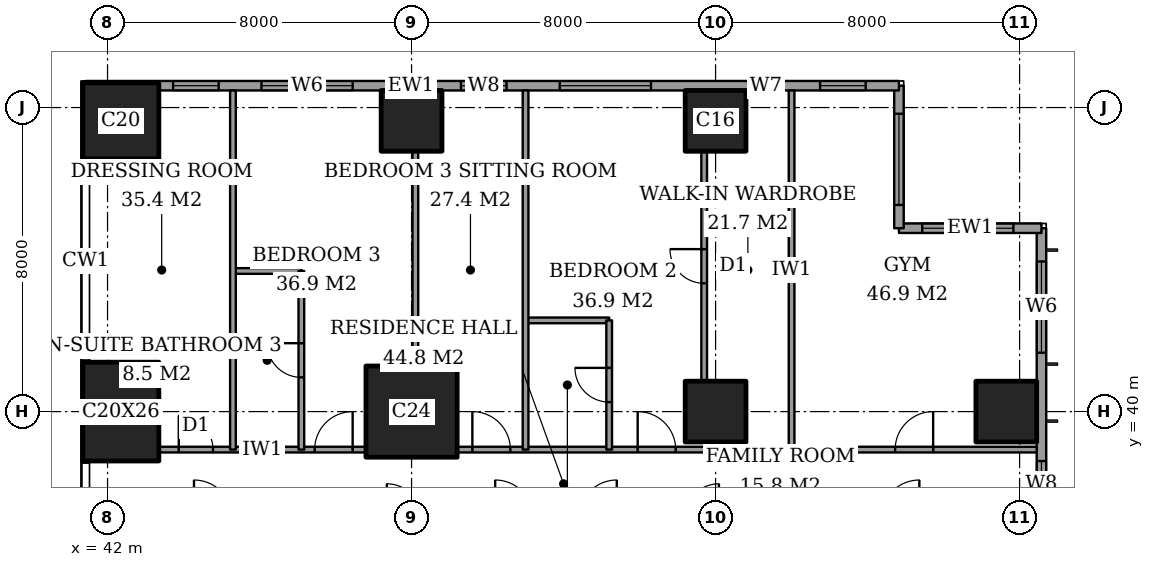
"""IFC4 building model, lengths in metres.
Left out: names, types, materials, properties, quantities, classifications, styles, units other than length and angle.
Written with IfcOpenShell. Run it as: python <this file> out.ifc"""

import sys

from ifc_helpers import new_model, si_unit, direction, frame, frame_2d, origin, origin_2d, place, context, subcontext, project, spatial, rectangle, extrude, element, fill, save


model = new_model("IFC4")
c1 = context("Model", 3, precision=1e-05, world=origin(), true_north=direction((0.0, 1.0)))
c2 = subcontext(c1, "Body", "Model", "MODEL_VIEW")
j1 = project(units=[si_unit("LENGTHUNIT", "METRE"), si_unit("PLANEANGLEUNIT", "RADIAN")], contexts=[c1])
p1 = place(None, origin())
s1 = spatial("IfcSite", under=j1, at=p1, CompositionType="ELEMENT")
p2 = place(p1, origin())
s2 = spatial("IfcBuilding", under=s1, at=p2, CompositionType="ELEMENT")
p3 = place(p2, frame((0.0, 0.0, 262.8)))
s3 = spatial("IfcBuildingStorey", under=s2, at=p3, CompositionType="ELEMENT", Elevation=262.8)
p4 = place(p3, frame((42.35, 40.0, 0.0), z_axis=(0.0, 0.0, 1.0), x_axis=(1.0, 0.0, 0.0)))
e1 = element("IfcColumn", 1, at=p4, inside=s3, PredefinedType="COLUMN", context=c2, shape_type="SweptSolid", body=[
    extrude(rectangle(XDim=2.0, YDim=2.6, at=origin_2d()), origin(), (0.0, 0.0, 1.0), 3.6),
])
p5 = place(p3, frame((42.35, 47.65, 0.0), z_axis=(0.0, 0.0, 1.0), x_axis=(1.0, 0.0, 0.0)))
e2 = element("IfcColumn", 2, at=p5, inside=s3, PredefinedType="COLUMN", context=c2, shape_type="SweptSolid", body=[
    extrude(rectangle(XDim=2.0, YDim=2.0, at=origin_2d()), origin(), (0.0, 0.0, 1.0), 3.6),
])
p6 = place(p3, frame((50.0, 40.0, 0.0), z_axis=(0.0, 0.0, 1.0), x_axis=(1.0, 0.0, 0.0)))
e3 = element("IfcColumn", 3, at=p6, inside=s3, PredefinedType="COLUMN", context=c2, shape_type="SweptSolid", body=[
    extrude(rectangle(XDim=2.4, YDim=2.4, at=origin_2d()), origin(), (0.0, 0.0, 1.0), 3.6),
])
for number, where, z_axis, x_axis in (
    (4, (50.0, 47.65, 0.0), (0.0, 0.0, 1.0), (1.0, 0.0, 0.0)),
    (5, (58.0, 40.0, 0.0), (0.0, 0.0, 1.0), (1.0, 0.0, 0.0)),
    (6, (58.0, 47.65, 0.0), (0.0, 0.0, 1.0), (1.0, 0.0, 0.0)),
    (7, (65.65, 40.0, 0.0), (0.0, 0.0, 1.0), (1.0, 0.0, 0.0)),
):
    element("IfcColumn", number, at=place(p3, frame(where, z_axis=z_axis, x_axis=x_axis)), inside=s3, PredefinedType="COLUMN", context=c2, shape_type="SweptSolid", body=[
        extrude(rectangle(XDim=1.6, YDim=1.6, at=origin_2d()), origin(), (0.0, 0.0, 1.0), 3.6),
    ])
p7 = place(p3, frame((66.575, 3.175, 0.0), z_axis=(0.0, 0.0, 1.0), x_axis=(0.0, 1.0, 0.0)))
e8 = element("IfcWall", 8, at=p7, inside=s3, PredefinedType="SOLIDWALL", context=c2, shape_type="SweptSolid", body=[
    extrude(rectangle(XDim=41.65, YDim=0.25, at=frame_2d((20.825, 0.0))), origin(), (0.0, 0.0, 1.0), 3.6),
])
p8 = place(p7, frame((0.875, 0.0, 0.6)))
e9 = element("IfcOpeningElement", 9, at=p8, cuts=e8, PredefinedType="OPENING", context=c2, shape_type="SweptSolid", body=[
    extrude(rectangle(XDim=2.4, YDim=2.0, at=frame_2d((1.2, 1.0))), frame((0.0, 0.135, 0.0), z_axis=(0.0, -1.0, 0.0), x_axis=(1.0, 0.0, 0.0)), (0.0, 0.0, 1.0), 0.27),
])
p9 = place(p7, frame((6.0, 0.0, 0.6)))
e10 = element("IfcOpeningElement", 10, at=p9, cuts=e8, PredefinedType="OPENING", context=c2, shape_type="SweptSolid", body=[
    extrude(rectangle(XDim=1.2, YDim=2.0, at=frame_2d((0.6, 1.0))), frame((0.0, 0.135, 0.0), z_axis=(0.0, -1.0, 0.0), x_axis=(1.0, 0.0, 0.0)), (0.0, 0.0, 1.0), 0.27),
])
p10 = place(p7, frame((8.525, 0.0, 0.6)))
e11 = element("IfcOpeningElement", 11, at=p10, cuts=e8, PredefinedType="OPENING", context=c2, shape_type="SweptSolid", body=[
    extrude(rectangle(XDim=2.4, YDim=2.0, at=frame_2d((1.2, 1.0))), frame((0.0, 0.135, 0.0), z_axis=(0.0, -1.0, 0.0), x_axis=(1.0, 0.0, 0.0)), (0.0, 0.0, 1.0), 0.27),
])
p11 = place(p7, frame((15.625, 0.0, 0.6)))
e12 = element("IfcOpeningElement", 12, at=p11, cuts=e8, PredefinedType="OPENING", context=c2, shape_type="SweptSolid", body=[
    extrude(rectangle(XDim=2.4, YDim=2.0, at=frame_2d((1.2, 1.0))), frame((0.0, 0.135, 0.0), z_axis=(0.0, -1.0, 0.0), x_axis=(1.0, 0.0, 0.0)), (0.0, 0.0, 1.0), 0.27),
])
p12 = place(p7, frame((23.525, 0.0, 0.6)))
e13 = element("IfcOpeningElement", 13, at=p12, cuts=e8, PredefinedType="OPENING", context=c2, shape_type="SweptSolid", body=[
    extrude(rectangle(XDim=2.4, YDim=2.0, at=frame_2d((1.2, 1.0))), frame((0.0, 0.135, 0.0), z_axis=(0.0, -1.0, 0.0), x_axis=(1.0, 0.0, 0.0)), (0.0, 0.0, 1.0), 0.27),
])
p13 = place(p7, frame((30.625, 0.0, 0.6)))
e14 = element("IfcOpeningElement", 14, at=p13, cuts=e8, PredefinedType="OPENING", context=c2, shape_type="SweptSolid", body=[
    extrude(rectangle(XDim=2.4, YDim=2.0, at=frame_2d((1.2, 1.0))), frame((0.0, 0.135, 0.0), z_axis=(0.0, -1.0, 0.0), x_axis=(1.0, 0.0, 0.0)), (0.0, 0.0, 1.0), 0.27),
])
p14 = place(p7, frame((34.325, 0.0, 0.6)))
e15 = element("IfcOpeningElement", 15, at=p14, cuts=e8, PredefinedType="OPENING", context=c2, shape_type="SweptSolid", body=[
    extrude(rectangle(XDim=1.2, YDim=2.0, at=frame_2d((0.6, 1.0))), frame((0.0, 0.135, 0.0), z_axis=(0.0, -1.0, 0.0), x_axis=(1.0, 0.0, 0.0)), (0.0, 0.0, 1.0), 0.27),
])
p15 = place(p7, frame((38.375, 0.0, 0.6)))
e16 = element("IfcOpeningElement", 16, at=p15, cuts=e8, PredefinedType="OPENING", context=c2, shape_type="SweptSolid", body=[
    extrude(rectangle(XDim=2.4, YDim=2.0, at=frame_2d((1.2, 1.0))), frame((0.0, 0.135, 0.0), z_axis=(0.0, -1.0, 0.0), x_axis=(1.0, 0.0, 0.0)), (0.0, 0.0, 1.0), 0.27),
])
p16 = place(p3, frame((66.575, 44.825, 0.0), z_axis=(0.0, 0.0, 1.0), x_axis=(-1.0, 0.0, 0.0)))
e17 = element("IfcWall", 17, at=p16, inside=s3, PredefinedType="SOLIDWALL", context=c2, shape_type="SweptSolid", body=[
    extrude(rectangle(XDim=3.75, YDim=0.25, at=frame_2d((1.875, 0.0))), origin(), (0.0, 0.0, 1.0), 3.6),
])
p17 = place(p16, frame((0.738, 0.0, 0.6)))
e18 = element("IfcOpeningElement", 18, at=p17, cuts=e17, PredefinedType="OPENING", context=c2, shape_type="SweptSolid", body=[
    extrude(rectangle(XDim=2.4, YDim=2.0, at=frame_2d((1.2, 1.0))), frame((0.0, 0.135, 0.0), z_axis=(0.0, -1.0, 0.0), x_axis=(1.0, 0.0, 0.0)), (0.0, 0.0, 1.0), 0.27),
])
p18 = place(p3, frame((62.825, 44.825, 0.0), z_axis=(0.0, 0.0, 1.0), x_axis=(0.0, 1.0, 0.0)))
e19 = element("IfcWall", 19, at=p18, inside=s3, PredefinedType="SOLIDWALL", context=c2, shape_type="SweptSolid", body=[
    extrude(rectangle(XDim=3.75, YDim=0.25, at=frame_2d((1.875, 0.0))), origin(), (0.0, 0.0, 1.0), 3.6),
])
p19 = place(p18, frame((0.613, 0.0, 0.6)))
e20 = element("IfcOpeningElement", 20, at=p19, cuts=e19, PredefinedType="OPENING", context=c2, shape_type="SweptSolid", body=[
    extrude(rectangle(XDim=2.4, YDim=2.0, at=frame_2d((1.2, 1.0))), frame((0.0, 0.135, 0.0), z_axis=(0.0, -1.0, 0.0), x_axis=(1.0, 0.0, 0.0)), (0.0, 0.0, 1.0), 0.27),
])
p20 = place(p3, frame((62.825, 48.575, 0.0), z_axis=(0.0, 0.0, 1.0), x_axis=(-1.0, 0.0, 0.0)))
e21 = element("IfcWall", 21, at=p20, inside=s3, PredefinedType="SOLIDWALL", context=c2, shape_type="SweptSolid", body=[
    extrude(rectangle(XDim=21.4, YDim=0.25, at=frame_2d((10.7, 0.0))), origin(), (0.0, 0.0, 1.0), 3.6),
])
p21 = place(p20, frame((0.875, 0.0, 0.6)))
e22 = element("IfcOpeningElement", 22, at=p21, cuts=e21, PredefinedType="OPENING", context=c2, shape_type="SweptSolid", body=[
    extrude(rectangle(XDim=1.2, YDim=2.0, at=frame_2d((0.6, 1.0))), frame((0.0, 0.135, 0.0), z_axis=(0.0, -1.0, 0.0), x_axis=(1.0, 0.0, 0.0)), (0.0, 0.0, 1.0), 0.27),
])
p22 = place(p20, frame((3.2, 0.0, 0.6)))
e23 = element("IfcOpeningElement", 23, at=p22, cuts=e21, PredefinedType="OPENING", context=c2, shape_type="SweptSolid", body=[
    extrude(rectangle(XDim=0.6, YDim=2.0, at=frame_2d((0.3, 1.0))), frame((0.0, 0.135, 0.0), z_axis=(0.0, -1.0, 0.0), x_axis=(1.0, 0.0, 0.0)), (0.0, 0.0, 1.0), 0.27),
])
p23 = place(p20, frame((6.525, 0.0, 0.6)))
e24 = element("IfcOpeningElement", 24, at=p23, cuts=e21, PredefinedType="OPENING", context=c2, shape_type="SweptSolid", body=[
    extrude(rectangle(XDim=2.4, YDim=2.0, at=frame_2d((1.2, 1.0))), frame((0.0, 0.135, 0.0), z_axis=(0.0, -1.0, 0.0), x_axis=(1.0, 0.0, 0.0)), (0.0, 0.0, 1.0), 0.27),
])
p24 = place(p20, frame((10.325, 0.0, 0.6)))
e25 = element("IfcOpeningElement", 25, at=p24, cuts=e21, PredefinedType="OPENING", context=c2, shape_type="SweptSolid", body=[
    extrude(rectangle(XDim=1.2, YDim=2.0, at=frame_2d((0.6, 1.0))), frame((0.0, 0.135, 0.0), z_axis=(0.0, -1.0, 0.0), x_axis=(1.0, 0.0, 0.0)), (0.0, 0.0, 1.0), 0.27),
])
p25 = place(p20, frame((14.375, 0.0, 0.6)))
e26 = element("IfcOpeningElement", 26, at=p25, cuts=e21, PredefinedType="OPENING", context=c2, shape_type="SweptSolid", body=[
    extrude(rectangle(XDim=2.4, YDim=2.0, at=frame_2d((1.2, 1.0))), frame((0.0, 0.135, 0.0), z_axis=(0.0, -1.0, 0.0), x_axis=(1.0, 0.0, 0.0)), (0.0, 0.0, 1.0), 0.27),
])
p26 = place(p20, frame((17.9, 0.0, 0.6)))
e27 = element("IfcOpeningElement", 27, at=p26, cuts=e21, PredefinedType="OPENING", context=c2, shape_type="SweptSolid", body=[
    extrude(rectangle(XDim=1.2, YDim=2.0, at=frame_2d((0.6, 1.0))), frame((0.0, 0.135, 0.0), z_axis=(0.0, -1.0, 0.0), x_axis=(1.0, 0.0, 0.0)), (0.0, 0.0, 1.0), 0.27),
])
p27 = place(p3, frame((43.35, 39.0, 0.0), z_axis=(0.0, 0.0, 1.0), x_axis=(1.0, 0.0, 0.0)))
e28 = element("IfcWall", 28, at=p27, inside=s3, PredefinedType="PARTITIONING", context=c2, shape_type="SweptSolid", body=[
    extrude(rectangle(XDim=5.45, YDim=0.15, at=frame_2d((2.725, 0.0))), origin(), (0.0, 0.0, 1.0), 3.35),
])
p28 = place(p27, frame((4.1, 0.0, 0.0)))
e29 = element("IfcOpeningElement", 29, at=p28, cuts=e28, PredefinedType="OPENING", context=c2, shape_type="SweptSolid", body=[
    extrude(rectangle(XDim=1.0, YDim=2.1, at=frame_2d((0.5, 1.05))), frame((0.0, 0.085, 0.0), z_axis=(0.0, -1.0, 0.0), x_axis=(1.0, 0.0, 0.0)), (0.0, 0.0, 1.0), 0.17),
])
p29 = place(p27, frame((0.525, 0.0, 0.0)))
e30 = element("IfcOpeningElement", 30, at=p29, cuts=e28, PredefinedType="OPENING", context=c2, shape_type="SweptSolid", body=[
    extrude(rectangle(XDim=0.9, YDim=2.1, at=frame_2d((0.45, 1.05))), frame((0.0, 0.085, 0.0), z_axis=(0.0, -1.0, 0.0), x_axis=(1.0, 0.0, 0.0)), (0.0, 0.0, 1.0), 0.17),
])
p30 = place(p3, frame((51.2, 39.0, 0.0), z_axis=(0.0, 0.0, 1.0), x_axis=(1.0, 0.0, 0.0)))
e31 = element("IfcWall", 31, at=p30, inside=s3, PredefinedType="PARTITIONING", context=c2, shape_type="SweptSolid", body=[
    extrude(rectangle(XDim=15.25, YDim=0.15, at=frame_2d((7.625, 0.0))), origin(), (0.0, 0.0, 1.0), 3.35),
])
p31 = place(p30, frame((11.525, 0.0, 0.0)))
e32 = element("IfcOpeningElement", 32, at=p31, cuts=e31, PredefinedType="OPENING", context=c2, shape_type="SweptSolid", body=[
    extrude(rectangle(XDim=1.0, YDim=2.1, at=frame_2d((0.5, 1.05))), frame((0.0, 0.085, 0.0), z_axis=(0.0, -1.0, 0.0), x_axis=(1.0, 0.0, 0.0)), (0.0, 0.0, 1.0), 0.17),
])
p32 = place(p30, frame((4.75, 0.0, 0.0)))
e33 = element("IfcOpeningElement", 33, at=p32, cuts=e31, PredefinedType="OPENING", context=c2, shape_type="SweptSolid", body=[
    extrude(rectangle(XDim=1.0, YDim=2.1, at=frame_2d((0.5, 1.05))), frame((0.0, 0.085, 0.0), z_axis=(0.0, -1.0, 0.0), x_axis=(1.0, 0.0, 0.0)), (0.0, 0.0, 1.0), 0.17),
])
p33 = place(p30, frame((0.4, 0.0, 0.0)))
e34 = element("IfcOpeningElement", 34, at=p33, cuts=e31, PredefinedType="OPENING", context=c2, shape_type="SweptSolid", body=[
    extrude(rectangle(XDim=1.0, YDim=2.1, at=frame_2d((0.5, 1.05))), frame((0.0, 0.085, 0.0), z_axis=(0.0, -1.0, 0.0), x_axis=(1.0, 0.0, 0.0)), (0.0, 0.0, 1.0), 0.17),
])
p34 = place(p3, frame((53.0, 42.4, 0.0), z_axis=(0.0, 0.0, 1.0), x_axis=(1.0, 0.0, 0.0)))
e35 = element("IfcWall", 35, at=p34, inside=s3, PredefinedType="PARTITIONING", context=c2, shape_type="SweptSolid", body=[
    extrude(rectangle(XDim=2.2, YDim=0.15, at=frame_2d((1.1, 0.0))), origin(), (0.0, 0.0, 1.0), 3.35),
])
p35 = place(p3, frame((45.3, 43.7, 0.0), z_axis=(0.0, 0.0, 1.0), x_axis=(1.0, 0.0, 0.0)))
e36 = element("IfcWall", 36, at=p35, inside=s3, PredefinedType="PARTITIONING", context=c2, shape_type="SweptSolid", body=[
    extrude(rectangle(XDim=1.8, YDim=0.15, at=frame_2d((0.9, 0.0))), origin(), (0.0, 0.0, 1.0), 3.35),
])
p36 = place(p3, frame((45.3, 39.0, 0.0), z_axis=(0.0, 0.0, 1.0), x_axis=(0.0, 1.0, 0.0)))
e37 = element("IfcWall", 37, at=p36, inside=s3, PredefinedType="PARTITIONING", context=c2, shape_type="SweptSolid", body=[
    extrude(rectangle(XDim=9.45, YDim=0.15, at=frame_2d((4.725, 0.0))), origin(), (0.0, 0.0, 1.0), 3.35),
])
p37 = place(p3, frame((47.1, 39.0, 0.0), z_axis=(0.0, 0.0, 1.0), x_axis=(0.0, 1.0, 0.0)))
e38 = element("IfcWall", 38, at=p37, inside=s3, PredefinedType="PARTITIONING", context=c2, shape_type="SweptSolid", body=[
    extrude(rectangle(XDim=4.7, YDim=0.15, at=frame_2d((2.35, 0.0))), origin(), (0.0, 0.0, 1.0), 3.35),
])
p38 = place(p37, frame((1.9, 0.0, 0.0)))
e39 = element("IfcOpeningElement", 39, at=p38, cuts=e38, PredefinedType="OPENING", context=c2, shape_type="SweptSolid", body=[
    extrude(rectangle(XDim=0.9, YDim=2.1, at=frame_2d((0.45, 1.05))), frame((0.0, 0.085, 0.0), z_axis=(0.0, -1.0, 0.0), x_axis=(1.0, 0.0, 0.0)), (0.0, 0.0, 1.0), 0.17),
])
p39 = place(p3, frame((50.1, 41.2, 0.0), z_axis=(0.0, 0.0, 1.0), x_axis=(0.0, 1.0, 0.0)))
e40 = element("IfcWall", 40, at=p39, inside=s3, PredefinedType="PARTITIONING", context=c2, shape_type="SweptSolid", body=[
    extrude(rectangle(XDim=5.65, YDim=0.15, at=frame_2d((2.825, 0.0))), origin(), (0.0, 0.0, 1.0), 3.35),
])
p40 = place(p3, frame((53.0, 39.0, 0.0), z_axis=(0.0, 0.0, 1.0), x_axis=(0.0, 1.0, 0.0)))
e41 = element("IfcWall", 41, at=p40, inside=s3, PredefinedType="PARTITIONING", context=c2, shape_type="SweptSolid", body=[
    extrude(rectangle(XDim=9.45, YDim=0.15, at=frame_2d((4.725, 0.0))), origin(), (0.0, 0.0, 1.0), 3.35),
])
p41 = place(p3, frame((55.2, 39.0, 0.0), z_axis=(0.0, 0.0, 1.0), x_axis=(0.0, 1.0, 0.0)))
e42 = element("IfcWall", 42, at=p41, inside=s3, PredefinedType="PARTITIONING", context=c2, shape_type="SweptSolid", body=[
    extrude(rectangle(XDim=3.4, YDim=0.15, at=frame_2d((1.7, 0.0))), origin(), (0.0, 0.0, 1.0), 3.35),
])
p42 = place(p41, frame((1.25, 0.0, 0.0)))
e43 = element("IfcOpeningElement", 43, at=p42, cuts=e42, PredefinedType="OPENING", context=c2, shape_type="SweptSolid", body=[
    extrude(rectangle(XDim=0.9, YDim=2.1, at=frame_2d((0.45, 1.05))), frame((0.0, 0.085, 0.0), z_axis=(0.0, -1.0, 0.0), x_axis=(1.0, 0.0, 0.0)), (0.0, 0.0, 1.0), 0.17),
])
p43 = place(p3, frame((57.7, 40.8, 0.0), z_axis=(0.0, 0.0, 1.0), x_axis=(0.0, 1.0, 0.0)))
e44 = element("IfcWall", 44, at=p43, inside=s3, PredefinedType="PARTITIONING", context=c2, shape_type="SweptSolid", body=[
    extrude(rectangle(XDim=6.05, YDim=0.15, at=frame_2d((3.025, 0.0))), origin(), (0.0, 0.0, 1.0), 3.35),
])
p44 = place(p43, frame((2.575, 0.0, 0.0)))
e45 = element("IfcOpeningElement", 45, at=p44, cuts=e44, PredefinedType="OPENING", context=c2, shape_type="SweptSolid", body=[
    extrude(rectangle(XDim=0.9, YDim=2.1, at=frame_2d((0.45, 1.05))), frame((0.0, 0.085, 0.0), z_axis=(0.0, -1.0, 0.0), x_axis=(1.0, 0.0, 0.0)), (0.0, 0.0, 1.0), 0.17),
])
p45 = place(p3, frame((60.0, 39.0, 0.0), z_axis=(0.0, 0.0, 1.0), x_axis=(0.0, 1.0, 0.0)))
e46 = element("IfcWall", 46, at=p45, inside=s3, PredefinedType="PARTITIONING", context=c2, shape_type="SweptSolid", body=[
    extrude(rectangle(XDim=9.45, YDim=0.15, at=frame_2d((4.725, 0.0))), origin(), (0.0, 0.0, 1.0), 3.35),
])
p46 = place(p14, origin())
e47 = element("IfcWindow", 47, at=p46, inside=s3, PartitioningType="SINGLE_PANEL", PredefinedType="WINDOW", context=c2, shape_type="SweptSolid", body=[
    extrude(rectangle(XDim=1.2, YDim=2.0, at=frame_2d((0.6, 1.0))), frame((0.0, 0.03, 0.0), z_axis=(0.0, -1.0, 0.0), x_axis=(1.0, 0.0, 0.0)), (0.0, 0.0, 1.0), 0.06),
])
fill(e15, e47)
p47 = place(p15, origin())
e48 = element("IfcWindow", 48, at=p47, inside=s3, PartitioningType="SINGLE_PANEL", PredefinedType="WINDOW", context=c2, shape_type="SweptSolid", body=[
    extrude(rectangle(XDim=2.4, YDim=2.0, at=frame_2d((1.2, 1.0))), frame((0.0, 0.03, 0.0), z_axis=(0.0, -1.0, 0.0), x_axis=(1.0, 0.0, 0.0)), (0.0, 0.0, 1.0), 0.06),
])
fill(e16, e48)
p48 = place(p17, origin())
e49 = element("IfcWindow", 49, at=p48, inside=s3, PartitioningType="SINGLE_PANEL", PredefinedType="WINDOW", context=c2, shape_type="SweptSolid", body=[
    extrude(rectangle(XDim=2.4, YDim=2.0, at=frame_2d((1.2, 1.0))), frame((0.0, 0.03, 0.0), z_axis=(0.0, -1.0, 0.0), x_axis=(1.0, 0.0, 0.0)), (0.0, 0.0, 1.0), 0.06),
])
fill(e18, e49)
p49 = place(p19, origin())
e50 = element("IfcWindow", 50, at=p49, inside=s3, PartitioningType="SINGLE_PANEL", PredefinedType="WINDOW", context=c2, shape_type="SweptSolid", body=[
    extrude(rectangle(XDim=2.4, YDim=2.0, at=frame_2d((1.2, 1.0))), frame((0.0, 0.03, 0.0), z_axis=(0.0, -1.0, 0.0), x_axis=(1.0, 0.0, 0.0)), (0.0, 0.0, 1.0), 0.06),
])
fill(e20, e50)
p50 = place(p21, origin())
e51 = element("IfcWindow", 51, at=p50, inside=s3, PartitioningType="SINGLE_PANEL", PredefinedType="WINDOW", context=c2, shape_type="SweptSolid", body=[
    extrude(rectangle(XDim=1.2, YDim=2.0, at=frame_2d((0.6, 1.0))), frame((0.0, 0.03, 0.0), z_axis=(0.0, -1.0, 0.0), x_axis=(1.0, 0.0, 0.0)), (0.0, 0.0, 1.0), 0.06),
])
fill(e22, e51)
p51 = place(p22, origin())
e52 = element("IfcWindow", 52, at=p51, inside=s3, PartitioningType="SINGLE_PANEL", PredefinedType="WINDOW", context=c2, shape_type="SweptSolid", body=[
    extrude(rectangle(XDim=0.6, YDim=2.0, at=frame_2d((0.3, 1.0))), frame((0.0, 0.03, 0.0), z_axis=(0.0, -1.0, 0.0), x_axis=(1.0, 0.0, 0.0)), (0.0, 0.0, 1.0), 0.06),
])
fill(e23, e52)
p52 = place(p23, origin())
e53 = element("IfcWindow", 53, at=p52, inside=s3, PartitioningType="SINGLE_PANEL", PredefinedType="WINDOW", context=c2, shape_type="SweptSolid", body=[
    extrude(rectangle(XDim=2.4, YDim=2.0, at=frame_2d((1.2, 1.0))), frame((0.0, 0.03, 0.0), z_axis=(0.0, -1.0, 0.0), x_axis=(1.0, 0.0, 0.0)), (0.0, 0.0, 1.0), 0.06),
])
fill(e24, e53)
p53 = place(p24, origin())
e54 = element("IfcWindow", 54, at=p53, inside=s3, PartitioningType="SINGLE_PANEL", PredefinedType="WINDOW", context=c2, shape_type="SweptSolid", body=[
    extrude(rectangle(XDim=1.2, YDim=2.0, at=frame_2d((0.6, 1.0))), frame((0.0, 0.03, 0.0), z_axis=(0.0, -1.0, 0.0), x_axis=(1.0, 0.0, 0.0)), (0.0, 0.0, 1.0), 0.06),
])
fill(e25, e54)
p54 = place(p25, origin())
e55 = element("IfcWindow", 55, at=p54, inside=s3, PartitioningType="SINGLE_PANEL", PredefinedType="WINDOW", context=c2, shape_type="SweptSolid", body=[
    extrude(rectangle(XDim=2.4, YDim=2.0, at=frame_2d((1.2, 1.0))), frame((0.0, 0.03, 0.0), z_axis=(0.0, -1.0, 0.0), x_axis=(1.0, 0.0, 0.0)), (0.0, 0.0, 1.0), 0.06),
])
fill(e26, e55)
p55 = place(p26, origin())
e56 = element("IfcWindow", 56, at=p55, inside=s3, PartitioningType="SINGLE_PANEL", PredefinedType="WINDOW", context=c2, shape_type="SweptSolid", body=[
    extrude(rectangle(XDim=1.2, YDim=2.0, at=frame_2d((0.6, 1.0))), frame((0.0, 0.03, 0.0), z_axis=(0.0, -1.0, 0.0), x_axis=(1.0, 0.0, 0.0)), (0.0, 0.0, 1.0), 0.06),
])
fill(e27, e56)
p56 = place(p31, origin())
e57 = element("IfcDoor", 57, at=p56, inside=s3, OperationType="SINGLE_SWING_LEFT", PredefinedType="DOOR", context=c2, shape_type="SweptSolid", body=[
    extrude(rectangle(XDim=1.0, YDim=2.1, at=frame_2d((0.5, 1.05))), frame((0.0, 0.025, 0.0), z_axis=(0.0, -1.0, 0.0), x_axis=(1.0, 0.0, 0.0)), (0.0, 0.0, 1.0), 0.05),
])
fill(e32, e57)
p57 = place(p44, origin())
e58 = element("IfcDoor", 58, at=p57, inside=s3, OperationType="SINGLE_SWING_LEFT", PredefinedType="DOOR", context=c2, shape_type="SweptSolid", body=[
    extrude(rectangle(XDim=0.9, YDim=2.1, at=frame_2d((0.45, 1.05))), frame((0.0, 0.025, 0.0), z_axis=(0.0, -1.0, 0.0), x_axis=(1.0, 0.0, 0.0)), (0.0, 0.0, 1.0), 0.05),
])
fill(e45, e58)
p58 = place(p42, origin())
e59 = element("IfcDoor", 59, at=p58, inside=s3, OperationType="SINGLE_SWING_LEFT", PredefinedType="DOOR", context=c2, shape_type="SweptSolid", body=[
    extrude(rectangle(XDim=0.9, YDim=2.1, at=frame_2d((0.45, 1.05))), frame((0.0, 0.025, 0.0), z_axis=(0.0, -1.0, 0.0), x_axis=(1.0, 0.0, 0.0)), (0.0, 0.0, 1.0), 0.05),
])
fill(e43, e59)
p59 = place(p32, origin())
e60 = element("IfcDoor", 60, at=p59, inside=s3, OperationType="SINGLE_SWING_RIGHT", PredefinedType="DOOR", context=c2, shape_type="SweptSolid", body=[
    extrude(rectangle(XDim=1.0, YDim=2.1, at=frame_2d((0.5, 1.05))), frame((0.0, 0.025, 0.0), z_axis=(0.0, -1.0, 0.0), x_axis=(1.0, 0.0, 0.0)), (0.0, 0.0, 1.0), 0.05),
])
fill(e33, e60)
p60 = place(p33, origin())
e61 = element("IfcDoor", 61, at=p60, inside=s3, OperationType="SINGLE_SWING_RIGHT", PredefinedType="DOOR", context=c2, shape_type="SweptSolid", body=[
    extrude(rectangle(XDim=1.0, YDim=2.1, at=frame_2d((0.5, 1.05))), frame((0.0, 0.025, 0.0), z_axis=(0.0, -1.0, 0.0), x_axis=(1.0, 0.0, 0.0)), (0.0, 0.0, 1.0), 0.05),
])
fill(e34, e61)
p61 = place(p38, origin())
e62 = element("IfcDoor", 62, at=p61, inside=s3, OperationType="SINGLE_SWING_LEFT", PredefinedType="DOOR", context=c2, shape_type="SweptSolid", body=[
    extrude(rectangle(XDim=0.9, YDim=2.1, at=frame_2d((0.45, 1.05))), frame((0.0, 0.025, 0.0), z_axis=(0.0, -1.0, 0.0), x_axis=(1.0, 0.0, 0.0)), (0.0, 0.0, 1.0), 0.05),
])
fill(e39, e62)
p62 = place(p28, origin())
e63 = element("IfcDoor", 63, at=p62, inside=s3, OperationType="SINGLE_SWING_LEFT", PredefinedType="DOOR", context=c2, shape_type="SweptSolid", body=[
    extrude(rectangle(XDim=1.0, YDim=2.1, at=frame_2d((0.5, 1.05))), frame((0.0, 0.025, 0.0), z_axis=(0.0, -1.0, 0.0), x_axis=(1.0, 0.0, 0.0)), (0.0, 0.0, 1.0), 0.05),
])
fill(e29, e63)
p63 = place(p29, origin())
e64 = element("IfcDoor", 64, at=p63, inside=s3, OperationType="SINGLE_SWING_RIGHT", PredefinedType="DOOR", context=c2, shape_type="SweptSolid", body=[
    extrude(rectangle(XDim=0.9, YDim=2.1, at=frame_2d((0.45, 1.05))), frame((0.0, 0.025, 0.0), z_axis=(0.0, -1.0, 0.0), x_axis=(1.0, 0.0, 0.0)), (0.0, 0.0, 1.0), 0.05),
])
fill(e30, e64)
save(model, sys.argv[1])
